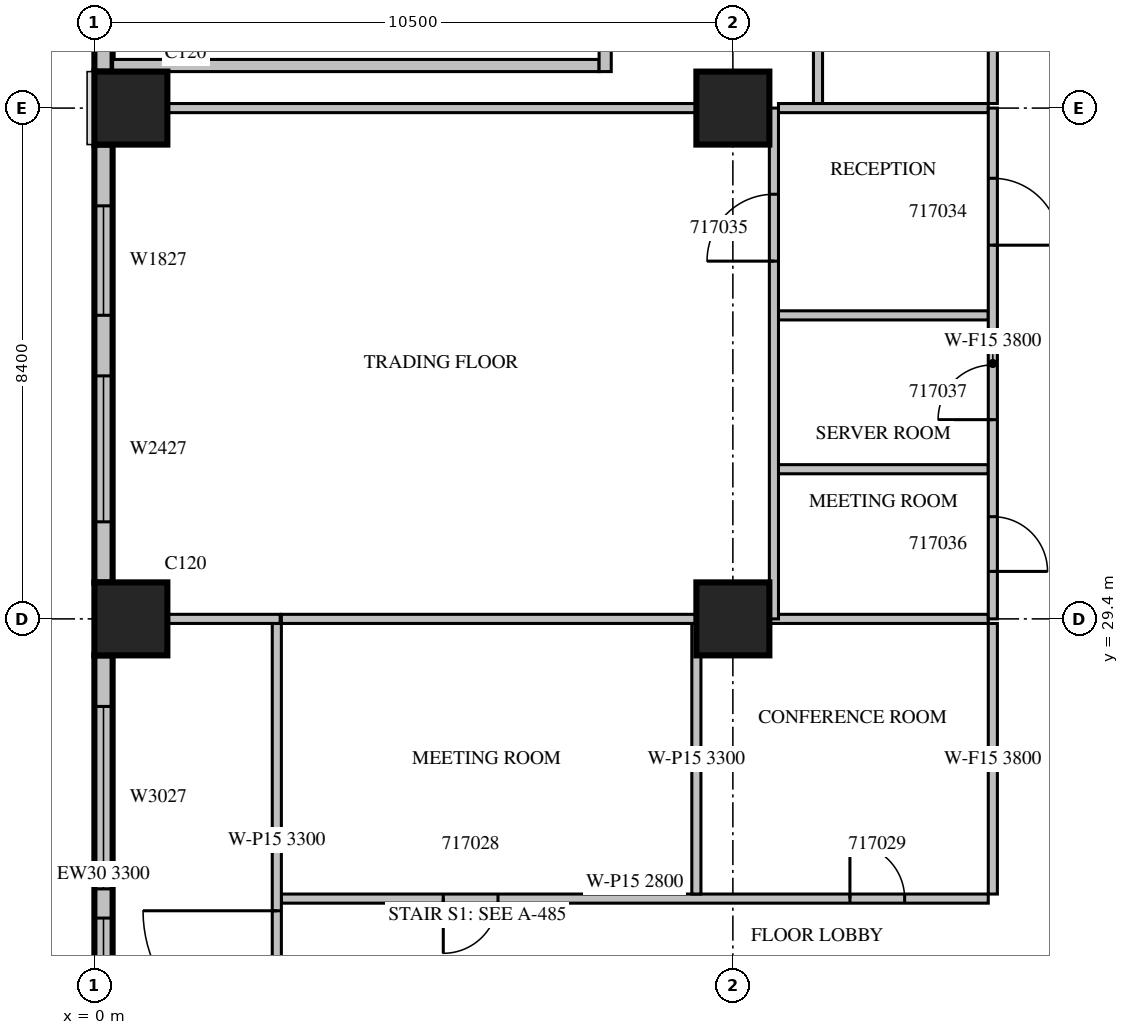
"""IFC4 building model, lengths in metres.
Left out: names, types, materials, properties, quantities, classifications, styles, units other than length and angle.
Written with IfcOpenShell. Run it as: python <this file> out.ifc"""

import sys

from ifc_helpers import new_model, si_unit, direction, frame, frame_2d, origin, origin_2d, place, context, subcontext, project, spatial, rectangle, extrude, source, transform, mapped, element, fill, save


model = new_model("IFC4")
c1 = context("Model", 3, precision=1e-05, world=origin(), true_north=direction((0.0, 1.0)))
c2 = subcontext(c1, "Body", "Model", "MODEL_VIEW")
j1 = project(units=[si_unit("LENGTHUNIT", "METRE"), si_unit("PLANEANGLEUNIT", "RADIAN")], contexts=[c1])
p1 = place(None, origin())
s1 = spatial("IfcSite", under=j1, at=p1, CompositionType="ELEMENT")
p2 = place(p1, origin())
s2 = spatial("IfcBuilding", under=s1, at=p2, CompositionType="ELEMENT")
p3 = place(p2, frame((0.0, 0.0, 82.5)))
s3 = spatial("IfcBuildingStorey", under=s2, at=p3, CompositionType="ELEMENT", Elevation=82.5)
m1 = source(origin(), c2, "Body", "SweptSolid", [
    extrude(rectangle(XDim=1.2, YDim=1.2, at=origin_2d()), origin(), (0.0, 0.0, 1.0), 4.2),
])
for number, where, z_axis, x_axis in (
    (1, (0.6, 29.4, 0.0), (0.0, 0.0, 1.0), (1.0, 0.0, 0.0)),
    (2, (10.5, 29.4, 0.0), (0.0, 0.0, 1.0), (1.0, 0.0, 0.0)),
    (3, (0.6, 37.8, 0.0), (0.0, 0.0, 1.0), (1.0, 0.0, 0.0)),
    (4, (10.5, 37.8, 0.0), (0.0, 0.0, 1.0), (1.0, 0.0, 0.0)),
):
    element("IfcColumn", number, at=place(p3, frame(where, z_axis=z_axis, x_axis=x_axis)), inside=s3, PredefinedType="COLUMN", context=c2, shape_type="MappedRepresentation", body=[
        mapped(m1, transform((0.0, 0.0, 0.0), scale=1.0)),
    ])
m2 = source(origin(), c2, "Body", "SweptSolid", [
    extrude(rectangle(XDim=1.8, YDim=0.3, at=frame_2d((0.9, 0.0))), origin(), (0.0, 0.0, 1.0), 3.8),
])
p4 = place(p3, frame((0.15, 40.2, 0.0), z_axis=(0.0, 0.0, 1.0), x_axis=(0.0, -1.0, 0.0)))
e5 = element("IfcWall", 5, at=p4, inside=s3, PredefinedType="STANDARD", context=c2, shape_type="MappedRepresentation", body=[
    mapped(m2, transform((0.0, 0.0, 0.0), scale=1.0)),
])
m3 = source(origin(), c2, "Body", "SweptSolid", [
    extrude(rectangle(XDim=7.2, YDim=0.3, at=frame_2d((3.6, 0.0))), origin(), (0.0, 0.0, 1.0), 3.8),
])
p5 = place(p3, frame((0.15, 37.2, 0.0), z_axis=(0.0, 0.0, 1.0), x_axis=(0.0, -1.0, 0.0)))
e6 = element("IfcWall", 6, at=p5, inside=s3, PredefinedType="STANDARD", context=c2, shape_type="MappedRepresentation", body=[
    mapped(m3, transform((0.0, 0.0, 0.0), scale=1.0)),
])
m4 = source(origin(), c2, "Body", "SweptSolid", [
    extrude(rectangle(XDim=1.8, YDim=2.7, at=frame_2d((0.9, 1.35))), frame((0.0, 0.16, 0.0), z_axis=(0.0, -1.0, 0.0), x_axis=(1.0, 0.0, 0.0)), (0.0, 0.0, 1.0), 0.32),
])
p6 = place(p5, frame((1.008, 0.0, 0.6)))
e7 = element("IfcOpeningElement", 7, at=p6, cuts=e6, PredefinedType="OPENING", context=c2, shape_type="MappedRepresentation", body=[
    mapped(m4, transform((0.0, 0.0, 0.0), scale=1.0)),
])
m5 = source(origin(), c2, "Body", "SweptSolid", [
    extrude(rectangle(XDim=2.4, YDim=2.7, at=frame_2d((1.2, 1.35))), frame((0.0, 0.16, 0.0), z_axis=(0.0, -1.0, 0.0), x_axis=(1.0, 0.0, 0.0)), (0.0, 0.0, 1.0), 0.32),
])
p7 = place(p5, frame((3.804, 0.0, 0.6)))
e8 = element("IfcOpeningElement", 8, at=p7, cuts=e6, PredefinedType="OPENING", context=c2, shape_type="MappedRepresentation", body=[
    mapped(m5, transform((0.0, 0.0, 0.0), scale=1.0)),
])
m6 = source(origin(), c2, "Body", "SweptSolid", [
    extrude(rectangle(XDim=7.2, YDim=0.3, at=frame_2d((3.6, 0.0))), origin(), (0.0, 0.0, 1.0), 3.3),
])
p8 = place(p3, frame((0.15, 28.8, 0.0), z_axis=(0.0, 0.0, 1.0), x_axis=(0.0, -1.0, 0.0)))
e9 = element("IfcWall", 9, at=p8, inside=s3, PredefinedType="STANDARD", context=c2, shape_type="MappedRepresentation", body=[
    mapped(m6, transform((0.0, 0.0, 0.0), scale=1.0)),
])
m7 = source(origin(), c2, "Body", "SweptSolid", [
    extrude(rectangle(XDim=3.0, YDim=2.7, at=frame_2d((1.5, 1.35))), frame((0.0, 0.16, 0.0), z_axis=(0.0, -1.0, 0.0), x_axis=(1.0, 0.0, 0.0)), (0.0, 0.0, 1.0), 0.32),
])
p9 = place(p8, frame((0.84, 0.0, 0.6)))
e10 = element("IfcOpeningElement", 10, at=p9, cuts=e9, PredefinedType="OPENING", context=c2, shape_type="MappedRepresentation", body=[
    mapped(m7, transform((0.0, 0.0, 0.0), scale=1.0)),
])
p10 = place(p8, frame((4.32, 0.0, 0.6)))
e11 = element("IfcOpeningElement", 11, at=p10, cuts=e9, PredefinedType="OPENING", context=c2, shape_type="MappedRepresentation", body=[
    mapped(m5, transform((0.0, 0.0, 0.0), scale=1.0)),
])
m8 = source(origin(), c2, "Body", "SweptSolid", [
    extrude(rectangle(XDim=8.0, YDim=0.2, at=frame_2d((4.0, 0.0))), origin(), (0.0, 0.0, 1.0), 3.8),
])
p11 = place(p3, frame((0.3, 38.5, 0.0), z_axis=(0.0, 0.0, 1.0), x_axis=(1.0, 0.0, 0.0)))
e12 = element("IfcWall", 12, at=p11, inside=s3, PredefinedType="PARTITIONING", context=c2, shape_type="MappedRepresentation", body=[
    mapped(m8, transform((0.0, 0.0, 0.0), scale=1.0)),
])
m9 = source(origin(), c2, "Body", "SweptSolid", [
    extrude(rectangle(XDim=5.45, YDim=0.2, at=frame_2d((2.725, 0.0))), origin(), (0.0, 0.0, 1.0), 3.8),
])
p12 = place(p3, frame((8.4, 38.4, 0.0), z_axis=(0.0, 0.0, 1.0), x_axis=(0.0, 1.0, 0.0)))
e13 = element("IfcWall", 13, at=p12, inside=s3, PredefinedType="PARTITIONING", context=c2, shape_type="MappedRepresentation", body=[
    mapped(m9, transform((0.0, 0.0, 0.0), scale=1.0)),
])
m10 = source(origin(), c2, "Body", "SweptSolid", [
    extrude(rectangle(XDim=1.2, YDim=2.1, at=frame_2d((0.6, 1.05))), frame((0.0, 0.11, 0.0), z_axis=(0.0, -1.0, 0.0), x_axis=(1.0, 0.0, 0.0)), (0.0, 0.0, 1.0), 0.22),
])
p13 = place(p12, frame((0.4, 0.0, 0.0)))
e14 = element("IfcOpeningElement", 14, at=p13, cuts=e13, PredefinedType="OPENING", context=c2, shape_type="MappedRepresentation", body=[
    mapped(m10, transform((0.0, 0.0, 0.0), scale=1.0)),
])
m11 = source(origin(), c2, "Body", "SweptSolid", [
    extrude(rectangle(XDim=0.9, YDim=2.1, at=frame_2d((0.45, 1.05))), frame((0.0, 0.11, 0.0), z_axis=(0.0, -1.0, 0.0), x_axis=(1.0, 0.0, 0.0)), (0.0, 0.0, 1.0), 0.22),
])
p14 = place(p12, frame((3.25, 0.0, 0.0)))
e15 = element("IfcOpeningElement", 15, at=p14, cuts=e13, PredefinedType="OPENING", context=c2, shape_type="MappedRepresentation", body=[
    mapped(m11, transform((0.0, 0.0, 0.0), scale=1.0)),
])
m12 = source(origin(), c2, "Body", "SweptSolid", [
    extrude(rectangle(XDim=11.625, YDim=0.15, at=frame_2d((5.812, 0.0))), origin(), (0.0, 0.0, 1.0), 2.8),
])
p15 = place(p3, frame((3.075, 24.8, 0.0), z_axis=(0.0, 0.0, 1.0), x_axis=(1.0, 0.0, 0.0)))
e16 = element("IfcWall", 16, at=p15, inside=s3, PredefinedType="PARTITIONING", context=c2, shape_type="MappedRepresentation", body=[
    mapped(m12, transform((0.0, 0.0, 0.0), scale=1.0)),
])
m13 = source(origin(), c2, "Body", "SweptSolid", [
    extrude(rectangle(XDim=0.9, YDim=2.1, at=frame_2d((0.45, 1.05))), frame((0.0, 0.085, 0.0), z_axis=(0.0, -1.0, 0.0), x_axis=(1.0, 0.0, 0.0)), (0.0, 0.0, 1.0), 0.17),
])
p16 = place(p15, frame((2.663, 0.0, 0.0)))
e17 = element("IfcOpeningElement", 17, at=p16, cuts=e16, PredefinedType="OPENING", context=c2, shape_type="MappedRepresentation", body=[
    mapped(m13, transform((0.0, 0.0, 0.0), scale=1.0)),
])
p17 = place(p15, frame((9.35, 0.0, 0.0)))
e18 = element("IfcOpeningElement", 18, at=p17, cuts=e16, PredefinedType="OPENING", context=c2, shape_type="MappedRepresentation", body=[
    mapped(m13, transform((0.0, 0.0, 0.0), scale=1.0)),
])
m14 = source(origin(), c2, "Body", "SweptSolid", [
    extrude(rectangle(XDim=4.45, YDim=0.15, at=frame_2d((2.225, 0.0))), origin(), (0.0, 0.0, 1.0), 3.3),
])
p18 = place(p3, frame((9.9, 24.875, 0.0), z_axis=(0.0, 0.0, 1.0), x_axis=(0.0, 1.0, 0.0)))
e19 = element("IfcWall", 19, at=p18, inside=s3, PredefinedType="PARTITIONING", context=c2, shape_type="MappedRepresentation", body=[
    mapped(m14, transform((0.0, 0.0, 0.0), scale=1.0)),
])
m15 = source(origin(), c2, "Body", "SweptSolid", [
    extrude(rectangle(XDim=4.45, YDim=0.15, at=frame_2d((2.225, 0.0))), origin(), (0.0, 0.0, 1.0), 3.8),
])
p19 = place(p3, frame((14.775, 24.875, 0.0), z_axis=(0.0, 0.0, 1.0), x_axis=(0.0, 1.0, 0.0)))
e20 = element("IfcWall", 20, at=p19, inside=s3, PredefinedType="PARTITIONING", context=c2, shape_type="MappedRepresentation", body=[
    mapped(m15, transform((0.0, 0.0, 0.0), scale=1.0)),
])
m16 = source(origin(), c2, "Body", "SweptSolid", [
    extrude(rectangle(XDim=6.826, YDim=0.15, at=frame_2d((3.413, 0.0))), origin(), (0.0, 0.0, 1.0), 3.8),
])
p20 = place(p3, frame((9.901, 29.4, 0.0), z_axis=(0.0, 0.0, 1.0), x_axis=(-1.0, 0.0, 0.0)))
e21 = element("IfcWall", 21, at=p20, inside=s3, PredefinedType="PARTITIONING", context=c2, shape_type="MappedRepresentation", body=[
    mapped(m16, transform((0.0, 0.0, 0.0), scale=1.0)),
])
m17 = source(origin(), c2, "Body", "SweptSolid", [
    extrude(rectangle(XDim=3.601, YDim=0.15, at=frame_2d((1.8, 0.0))), origin(), (0.0, 0.0, 1.0), 3.8),
])
p21 = place(p3, frame((14.7, 29.4, 0.0), z_axis=(0.0, 0.0, 1.0), x_axis=(-1.0, 0.0, 0.0)))
e22 = element("IfcWall", 22, at=p21, inside=s3, PredefinedType="PARTITIONING", context=c2, shape_type="MappedRepresentation", body=[
    mapped(m17, transform((0.0, 0.0, 0.0), scale=1.0)),
])
m18 = source(origin(), c2, "Body", "SweptSolid", [
    extrude(rectangle(XDim=7.125, YDim=0.15, at=frame_2d((3.562, 0.0))), origin(), (0.0, 0.0, 1.0), 3.3),
])
p22 = place(p3, frame((3.0, 29.325, 0.0), z_axis=(0.0, 0.0, 1.0), x_axis=(0.0, -1.0, 0.0)))
e23 = element("IfcWall", 23, at=p22, inside=s3, PredefinedType="PARTITIONING", context=c2, shape_type="MappedRepresentation", body=[
    mapped(m18, transform((0.0, 0.0, 0.0), scale=1.0)),
])
m19 = source(origin(), c2, "Body", "SweptSolid", [
    extrude(rectangle(XDim=2.2, YDim=2.1, at=frame_2d((1.1, 1.05))), frame((0.0, 0.085, 0.0), z_axis=(0.0, -1.0, 0.0), x_axis=(1.0, 0.0, 0.0)), (0.0, 0.0, 1.0), 0.17),
])
p23 = place(p22, frame((4.725, 0.0, 0.0)))
e24 = element("IfcOpeningElement", 24, at=p23, cuts=e23, PredefinedType="OPENING", context=c2, shape_type="MappedRepresentation", body=[
    mapped(m19, transform((0.0, 0.0, 0.0), scale=1.0)),
])
m20 = source(origin(), c2, "Body", "SweptSolid", [
    extrude(rectangle(XDim=6.45, YDim=0.15, at=frame_2d((3.225, 0.0))), origin(), (0.0, 0.0, 1.0), 3.8),
])
p24 = place(p3, frame((11.9, 44.325, 0.0), z_axis=(0.0, 0.0, 1.0), x_axis=(0.0, -1.0, 0.0)))
e25 = element("IfcWall", 25, at=p24, inside=s3, PredefinedType="PARTITIONING", context=c2, shape_type="MappedRepresentation", body=[
    mapped(m20, transform((0.0, 0.0, 0.0), scale=1.0)),
])
p25 = place(p3, frame((14.775, 37.875, 0.0), z_axis=(0.0, 0.0, 1.0), x_axis=(0.0, 1.0, 0.0)))
e26 = element("IfcWall", 26, at=p25, inside=s3, PredefinedType="PARTITIONING", context=c2, shape_type="MappedRepresentation", body=[
    mapped(m20, transform((0.0, 0.0, 0.0), scale=1.0)),
])
p26 = place(p25, frame((2.737, 0.0, 0.0)))
e27 = element("IfcOpeningElement", 27, at=p26, cuts=e26, PredefinedType="OPENING", context=c2, shape_type="MappedRepresentation", body=[
    mapped(m13, transform((0.0, 0.0, 0.0), scale=1.0)),
])
m21 = source(origin(), c2, "Body", "SweptSolid", [
    extrude(rectangle(XDim=3.45, YDim=0.15, at=frame_2d((1.725, 0.0))), origin(), (0.0, 0.0, 1.0), 3.8),
])
for number, where, z_axis, x_axis in (
    (28, (14.7, 31.861, 0.0), (0.0, 0.0, 1.0), (-1.0, 0.0, 0.0)),
    (29, (14.7, 34.391, 0.0), (0.0, 0.0, 1.0), (-1.0, 0.0, 0.0)),
):
    element("IfcWall", number, at=place(p3, frame(where, z_axis=z_axis, x_axis=x_axis)), inside=s3, PredefinedType="PARTITIONING", context=c2, shape_type="MappedRepresentation", body=[
        mapped(m21, transform((0.0, 0.0, 0.0), scale=1.0)),
    ])
m22 = source(origin(), c2, "Body", "SweptSolid", [
    extrude(rectangle(XDim=1.856, YDim=0.15, at=frame_2d((0.928, 0.0))), origin(), (0.0, 0.0, 1.0), 3.8),
])
p27 = place(p3, frame((3.055, 29.4, 0.0), z_axis=(0.0, 0.0, 1.0), x_axis=(-1.0, 0.0, 0.0)))
e30 = element("IfcWall", 30, at=p27, inside=s3, PredefinedType="PARTITIONING", context=c2, shape_type="MappedRepresentation", body=[
    mapped(m22, transform((0.0, 0.0, 0.0), scale=1.0)),
])
m23 = source(origin(), c2, "Body", "SweptSolid", [
    extrude(rectangle(XDim=8.702, YDim=0.15, at=frame_2d((4.351, 0.0))), origin(), (0.0, 0.0, 1.0), 3.8),
])
p28 = place(p3, frame((9.901, 37.8, 0.0), z_axis=(0.0, 0.0, 1.0), x_axis=(-1.0, 0.0, 0.0)))
e31 = element("IfcWall", 31, at=p28, inside=s3, PredefinedType="PARTITIONING", context=c2, shape_type="MappedRepresentation", body=[
    mapped(m23, transform((0.0, 0.0, 0.0), scale=1.0)),
])
p29 = place(p3, frame((14.7, 37.8, 0.0), z_axis=(0.0, 0.0, 1.0), x_axis=(-1.0, 0.0, 0.0)))
e32 = element("IfcWall", 32, at=p29, inside=s3, PredefinedType="PARTITIONING", context=c2, shape_type="MappedRepresentation", body=[
    mapped(m21, transform((0.0, 0.0, 0.0), scale=1.0)),
])
m24 = source(origin(), c2, "Body", "SweptSolid", [
    extrude(rectangle(XDim=8.4, YDim=0.15, at=frame_2d((4.2, 0.0))), origin(), (0.0, 0.0, 1.0), 3.8),
])
p30 = place(p3, frame((11.175, 29.4, 0.0), z_axis=(0.0, 0.0, 1.0), x_axis=(0.0, 1.0, 0.0)))
e33 = element("IfcWall", 33, at=p30, inside=s3, PredefinedType="PARTITIONING", context=c2, shape_type="MappedRepresentation", body=[
    mapped(m24, transform((0.0, 0.0, 0.0), scale=1.0)),
])
m25 = source(origin(), c2, "Body", "SweptSolid", [
    extrude(rectangle(XDim=1.1, YDim=2.1, at=frame_2d((0.55, 1.05))), frame((0.0, 0.085, 0.0), z_axis=(0.0, -1.0, 0.0), x_axis=(1.0, 0.0, 0.0)), (0.0, 0.0, 1.0), 0.17),
])
p31 = place(p30, frame((5.883, 0.0, 0.0)))
e34 = element("IfcOpeningElement", 34, at=p31, cuts=e33, PredefinedType="OPENING", context=c2, shape_type="MappedRepresentation", body=[
    mapped(m25, transform((0.0, 0.0, 0.0), scale=1.0)),
])
p32 = place(p3, frame((14.775, 29.4, 0.0), z_axis=(0.0, 0.0, 1.0), x_axis=(0.0, 1.0, 0.0)))
e35 = element("IfcWall", 35, at=p32, inside=s3, PredefinedType="PARTITIONING", context=c2, shape_type="MappedRepresentation", body=[
    mapped(m24, transform((0.0, 0.0, 0.0), scale=1.0)),
])
p33 = place(p32, frame((6.146, 0.0, 0.0)))
e36 = element("IfcOpeningElement", 36, at=p33, cuts=e35, PredefinedType="OPENING", context=c2, shape_type="MappedRepresentation", body=[
    mapped(m25, transform((0.0, 0.0, 0.0), scale=1.0)),
])
p34 = place(p32, frame((0.781, 0.0, 0.0)))
e37 = element("IfcOpeningElement", 37, at=p34, cuts=e35, PredefinedType="OPENING", context=c2, shape_type="MappedRepresentation", body=[
    mapped(m13, transform((0.0, 0.0, 0.0), scale=1.0)),
])
p35 = place(p32, frame((3.276, 0.0, 0.0)))
e38 = element("IfcOpeningElement", 38, at=p35, cuts=e35, PredefinedType="OPENING", context=c2, shape_type="MappedRepresentation", body=[
    mapped(m13, transform((0.0, 0.0, 0.0), scale=1.0)),
])
m26 = source(origin(), c2, "Body", "SweptSolid", [
    extrude(rectangle(XDim=1.8, YDim=2.7, at=frame_2d((0.9, 1.35))), frame((0.0, 0.03, 0.0), z_axis=(0.0, -1.0, 0.0), x_axis=(1.0, 0.0, 0.0)), (0.0, 0.0, 1.0), 0.06),
])
p36 = place(p6, origin())
e39 = element("IfcWindow", 39, at=p36, inside=s3, PartitioningType="SINGLE_PANEL", PredefinedType="WINDOW", context=c2, shape_type="MappedRepresentation", body=[
    mapped(m26, transform((0.0, 0.0, 0.0), scale=1.0)),
])
fill(e7, e39)
m27 = source(origin(), c2, "Body", "SweptSolid", [
    extrude(rectangle(XDim=3.0, YDim=2.7, at=frame_2d((1.5, 1.35))), frame((0.0, 0.03, 0.0), z_axis=(0.0, -1.0, 0.0), x_axis=(1.0, 0.0, 0.0)), (0.0, 0.0, 1.0), 0.06),
])
p37 = place(p9, origin())
e40 = element("IfcWindow", 40, at=p37, inside=s3, PartitioningType="SINGLE_PANEL", PredefinedType="WINDOW", context=c2, shape_type="MappedRepresentation", body=[
    mapped(m27, transform((0.0, 0.0, 0.0), scale=1.0)),
])
fill(e10, e40)
m28 = source(origin(), c2, "Body", "SweptSolid", [
    extrude(rectangle(XDim=2.4, YDim=2.7, at=frame_2d((1.2, 1.35))), frame((0.0, 0.03, 0.0), z_axis=(0.0, -1.0, 0.0), x_axis=(1.0, 0.0, 0.0)), (0.0, 0.0, 1.0), 0.06),
])
p38 = place(p7, origin())
e41 = element("IfcWindow", 41, at=p38, inside=s3, PartitioningType="SINGLE_PANEL", PredefinedType="WINDOW", context=c2, shape_type="MappedRepresentation", body=[
    mapped(m28, transform((0.0, 0.0, 0.0), scale=1.0)),
])
fill(e8, e41)
p39 = place(p10, origin())
e42 = element("IfcWindow", 42, at=p39, inside=s3, PartitioningType="SINGLE_PANEL", PredefinedType="WINDOW", context=c2, shape_type="MappedRepresentation", body=[
    mapped(m28, transform((0.0, 0.0, 0.0), scale=1.0)),
])
fill(e11, e42)
m29 = source(origin(), c2, "Body", "SweptSolid", [
    extrude(rectangle(XDim=0.9, YDim=2.1, at=frame_2d((0.45, 1.05))), frame((0.0, 0.025, 0.0), z_axis=(0.0, -1.0, 0.0), x_axis=(1.0, 0.0, 0.0)), (0.0, 0.0, 1.0), 0.05),
])
p40 = place(p16, origin())
e43 = element("IfcDoor", 43, at=p40, inside=s3, OperationType="SINGLE_SWING_RIGHT", PredefinedType="DOOR", context=c2, shape_type="MappedRepresentation", body=[
    mapped(m29, transform((0.0, 0.0, 0.0), scale=1.0)),
])
fill(e17, e43)
p41 = place(p17, origin())
e44 = element("IfcDoor", 44, at=p41, inside=s3, OperationType="SINGLE_SWING_LEFT", PredefinedType="DOOR", context=c2, shape_type="MappedRepresentation", body=[
    mapped(m29, transform((0.0, 0.0, 0.0), scale=1.0)),
])
fill(e18, e44)
m30 = source(origin(), c2, "Body", "SweptSolid", [
    extrude(rectangle(XDim=2.2, YDim=2.1, at=frame_2d((1.1, 1.05))), frame((0.0, 0.025, 0.0), z_axis=(0.0, -1.0, 0.0), x_axis=(1.0, 0.0, 0.0)), (0.0, 0.0, 1.0), 0.05),
])
p42 = place(p23, origin())
e45 = element("IfcDoor", 45, at=p42, inside=s3, OperationType="DOUBLE_DOOR_SINGLE_SWING", PredefinedType="DOOR", context=c2, shape_type="MappedRepresentation", body=[
    mapped(m30, transform((0.0, 0.0, 0.0), scale=1.0)),
])
fill(e24, e45)
m31 = source(origin(), c2, "Body", "SweptSolid", [
    extrude(rectangle(XDim=1.1, YDim=2.1, at=frame_2d((0.55, 1.05))), frame((0.0, 0.025, 0.0), z_axis=(0.0, -1.0, 0.0), x_axis=(1.0, 0.0, 0.0)), (0.0, 0.0, 1.0), 0.05),
])
p43 = place(p33, origin())
e46 = element("IfcDoor", 46, at=p43, inside=s3, OperationType="SINGLE_SWING_RIGHT", PredefinedType="DOOR", context=c2, shape_type="MappedRepresentation", body=[
    mapped(m31, transform((0.0, 0.0, 0.0), scale=1.0)),
])
fill(e36, e46)
p44 = place(p31, origin())
e47 = element("IfcDoor", 47, at=p44, inside=s3, OperationType="SINGLE_SWING_LEFT", PredefinedType="DOOR", context=c2, shape_type="MappedRepresentation", body=[
    mapped(m31, transform((0.0, 0.0, 0.0), scale=1.0)),
])
fill(e34, e47)
p45 = place(p34, origin())
e48 = element("IfcDoor", 48, at=p45, inside=s3, OperationType="SINGLE_SWING_RIGHT", PredefinedType="DOOR", context=c2, shape_type="MappedRepresentation", body=[
    mapped(m29, transform((0.0, 0.0, 0.0), scale=1.0)),
])
fill(e37, e48)
p46 = place(p35, origin())
e49 = element("IfcDoor", 49, at=p46, inside=s3, OperationType="SINGLE_SWING_LEFT", PredefinedType="DOOR", context=c2, shape_type="MappedRepresentation", body=[
    mapped(m29, transform((0.0, 0.0, 0.0), scale=1.0)),
])
fill(e38, e49)
save(model, sys.argv[1])
